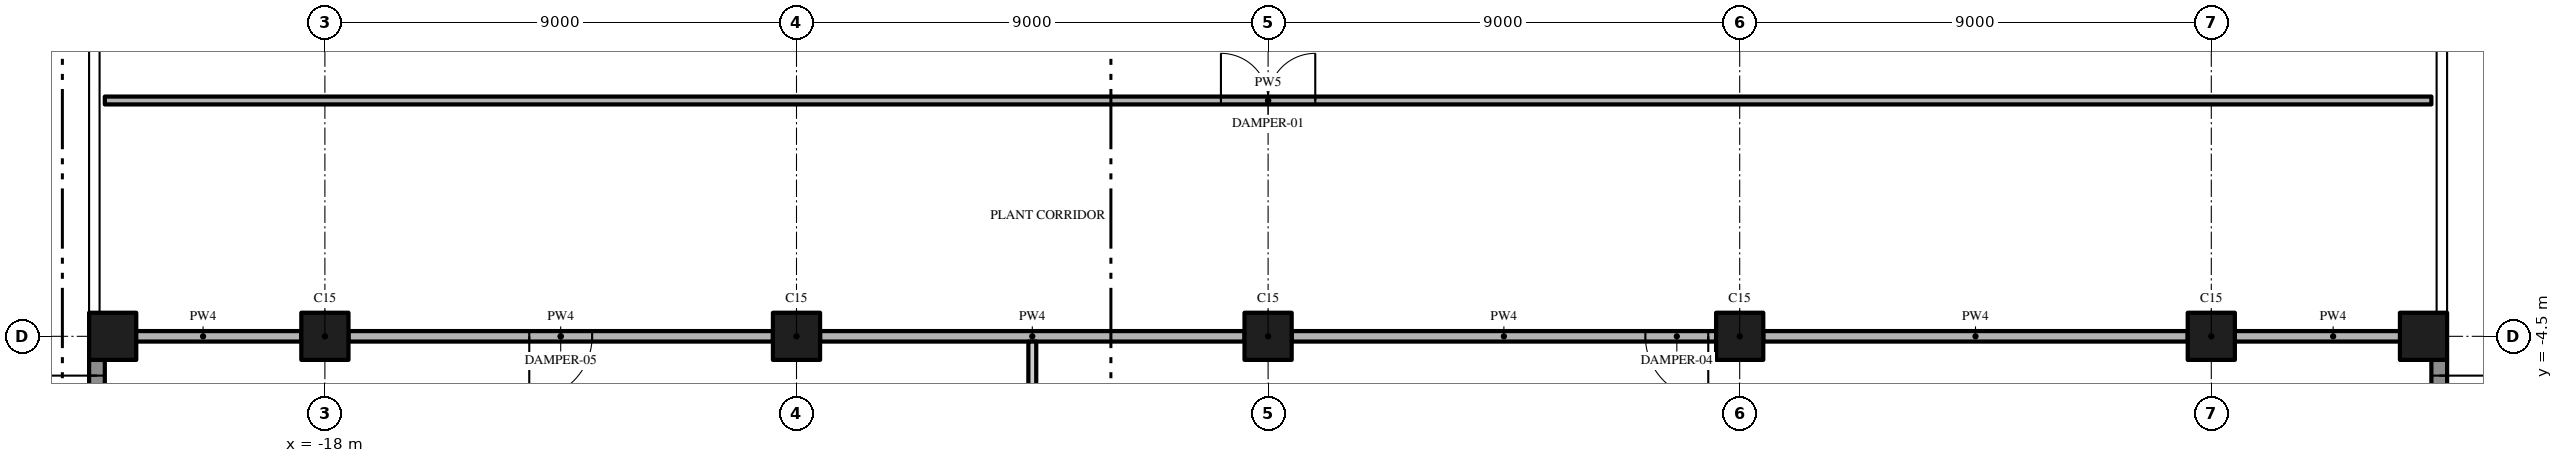
"""IFC4 building model, lengths in metres.
Left out: names, types, materials, properties, quantities, classifications, styles, units other than length and angle.
Written with IfcOpenShell. Run it as: python <this file> out.ifc"""

import sys

from ifc_helpers import new_model, si_unit, direction, frame, frame_2d, origin, origin_2d, place, context, subcontext, project, spatial, rectangle, extrude, element, fill, save


model = new_model("IFC4")
c1 = context("Model", 3, precision=1e-05, world=origin(), true_north=direction((0.0, 1.0)))
c2 = subcontext(c1, "Body", "Model", "MODEL_VIEW")
j1 = project(units=[si_unit("LENGTHUNIT", "METRE"), si_unit("PLANEANGLEUNIT", "RADIAN")], contexts=[c1])
p1 = place(None, origin())
s1 = spatial("IfcSite", under=j1, at=p1, CompositionType="ELEMENT")
p2 = place(p1, origin())
s2 = spatial("IfcBuilding", under=s1, at=p2, CompositionType="ELEMENT")
p3 = place(p2, frame((0.0, 0.0, 289.4)))
s3 = spatial("IfcBuildingStorey", under=s2, at=p3, CompositionType="ELEMENT", Elevation=289.4)
p4 = place(p3, frame((-18.0, -4.5, 0.0), z_axis=(0.0, 0.0, 1.0), x_axis=(1.0, 0.0, 0.0)))
e1 = element("IfcColumn", 1, at=p4, inside=s3, PredefinedType="COLUMN", context=c2, shape_type="SweptSolid", body=[
    extrude(rectangle(XDim=0.9, YDim=0.9, at=origin_2d()), origin(), (0.0, 0.0, 1.0), 7.7),
])
p5 = place(p3, frame((-26.55, -4.5, 0.0), z_axis=(0.504568019295, 0.0, 0.863371944127), x_axis=(0.0, 1.0, 0.0)))
e2 = element("IfcColumn", 2, at=p5, inside=s3, PredefinedType="COLUMN", context=c2, shape_type="SweptSolid", body=[
    extrude(rectangle(XDim=0.9, YDim=0.9, at=origin_2d()), origin(), (0.0, 0.0, 1.0), 8.919),
])
for number, where, z_axis, x_axis in (
    (3, (-9.0, -4.5, 0.0), (0.0, 0.0, 1.0), (1.0, 0.0, 0.0)),
    (4, (0.0, -4.5, 0.0), (0.0, 0.0, 1.0), (1.0, 0.0, 0.0)),
    (5, (18.0, -4.5, 0.0), (0.0, 0.0, 1.0), (1.0, 0.0, 0.0)),
):
    element("IfcColumn", number, at=place(p3, frame(where, z_axis=z_axis, x_axis=x_axis)), inside=s3, PredefinedType="COLUMN", context=c2, shape_type="SweptSolid", body=[
        extrude(rectangle(XDim=0.9, YDim=0.9, at=origin_2d()), origin(), (0.0, 0.0, 1.0), 7.7),
    ])
p6 = place(p3, frame((26.55, -4.5, 0.0), z_axis=(-0.504568019295, 0.0, 0.863371944127), x_axis=(0.0, -1.0, 0.0)))
e6 = element("IfcColumn", 6, at=p6, inside=s3, PredefinedType="COLUMN", context=c2, shape_type="SweptSolid", body=[
    extrude(rectangle(XDim=0.9, YDim=0.9, at=origin_2d()), origin(), (0.0, 0.0, 1.0), 8.919),
])
p7 = place(p3, frame((9.0, -4.5, 0.0), z_axis=(0.0, 0.0, 1.0), x_axis=(1.0, 0.0, 0.0)))
e7 = element("IfcColumn", 7, at=p7, inside=s3, PredefinedType="COLUMN", context=c2, shape_type="SweptSolid", body=[
    extrude(rectangle(XDim=0.9, YDim=0.9, at=origin_2d()), origin(), (0.0, 0.0, 1.0), 7.7),
])
p8 = place(p3, frame((22.35, -4.95, 0.0), z_axis=(0.0, 0.0, 1.0), x_axis=(0.0, -1.0, 0.0)))
e8 = element("IfcWall", 8, at=p8, inside=s3, PredefinedType="SOLIDWALL", context=c2, shape_type="SweptSolid", body=[
    extrude(rectangle(XDim=4.05, YDim=0.3, at=frame_2d((2.025, 0.0))), origin(), (0.0, 0.0, 1.0), 7.7),
])
p9 = place(p8, frame((0.3, 0.0, 0.0)))
e9 = element("IfcOpeningElement", 9, at=p9, cuts=e8, PredefinedType="OPENING", context=c2, shape_type="SweptSolid", body=[
    extrude(rectangle(XDim=3.2, YDim=2.4, at=frame_2d((1.6, 1.2))), frame((0.0, 0.16, 0.0), z_axis=(0.0, -1.0, 0.0), x_axis=(1.0, 0.0, 0.0)), (0.0, 0.0, 1.0), 0.32),
])
p10 = place(p3, frame((-22.35, -9.0, 0.0), z_axis=(0.0, 0.0, 1.0), x_axis=(0.0, 1.0, 0.0)))
e10 = element("IfcWall", 10, at=p10, inside=s3, PredefinedType="SOLIDWALL", context=c2, shape_type="SweptSolid", body=[
    extrude(rectangle(XDim=4.05, YDim=0.3, at=frame_2d((2.025, 0.0))), origin(), (0.0, 0.0, 1.0), 7.7),
])
p11 = place(p10, frame((0.55, 0.0, 0.0)))
e11 = element("IfcOpeningElement", 11, at=p11, cuts=e10, PredefinedType="OPENING", context=c2, shape_type="SweptSolid", body=[
    extrude(rectangle(XDim=3.2, YDim=2.4, at=frame_2d((1.6, 1.2))), frame((0.0, 0.16, 0.0), z_axis=(0.0, -1.0, 0.0), x_axis=(1.0, 0.0, 0.0)), (0.0, 0.0, 1.0), 0.32),
])
p12 = place(p3, frame((-22.2, -4.5, 0.0), z_axis=(0.0, 0.0, 1.0), x_axis=(1.0, 0.0, 0.0)))
e12 = element("IfcWall", 12, at=p12, inside=s3, PredefinedType="PARTITIONING", context=c2, shape_type="SweptSolid", body=[
    extrude(rectangle(XDim=3.75, YDim=0.2, at=frame_2d((1.875, 0.0))), origin(), (0.0, 0.0, 1.0), 7.7),
])
p13 = place(p3, frame((-9.45, -4.5, 0.0), z_axis=(0.0, 0.0, 1.0), x_axis=(-1.0, 0.0, 0.0)))
e13 = element("IfcWall", 13, at=p13, inside=s3, PredefinedType="PARTITIONING", context=c2, shape_type="SweptSolid", body=[
    extrude(rectangle(XDim=8.1, YDim=0.2, at=frame_2d((4.05, 0.0))), origin(), (0.0, 0.0, 1.0), 7.7),
])
p14 = place(p13, frame((3.45, 0.0, 0.0)))
e14 = element("IfcOpeningElement", 14, at=p14, cuts=e13, PredefinedType="OPENING", context=c2, shape_type="SweptSolid", body=[
    extrude(rectangle(XDim=1.2, YDim=2.4, at=frame_2d((0.6, 1.2))), frame((0.0, 0.11, 0.0), z_axis=(0.0, -1.0, 0.0), x_axis=(1.0, 0.0, 0.0)), (0.0, 0.0, 1.0), 0.22),
])
p15 = place(p3, frame((-8.55, -4.5, 0.0), z_axis=(0.0, 0.0, 1.0), x_axis=(1.0, 0.0, 0.0)))
e15 = element("IfcWall", 15, at=p15, inside=s3, PredefinedType="PARTITIONING", context=c2, shape_type="SweptSolid", body=[
    extrude(rectangle(XDim=8.1, YDim=0.2, at=frame_2d((4.05, 0.0))), origin(), (0.0, 0.0, 1.0), 7.7),
])
p16 = place(p3, frame((8.55, -4.5, 0.0), z_axis=(0.0, 0.0, 1.0), x_axis=(-1.0, 0.0, 0.0)))
e16 = element("IfcWall", 16, at=p16, inside=s3, PredefinedType="PARTITIONING", context=c2, shape_type="SweptSolid", body=[
    extrude(rectangle(XDim=8.1, YDim=0.2, at=frame_2d((4.05, 0.0))), origin(), (0.0, 0.0, 1.0), 7.7),
])
p17 = place(p16, frame((0.15, 0.0, 0.0)))
e17 = element("IfcOpeningElement", 17, at=p17, cuts=e16, PredefinedType="OPENING", context=c2, shape_type="SweptSolid", body=[
    extrude(rectangle(XDim=1.2, YDim=2.4, at=frame_2d((0.6, 1.2))), frame((0.0, 0.11, 0.0), z_axis=(0.0, -1.0, 0.0), x_axis=(1.0, 0.0, 0.0)), (0.0, 0.0, 1.0), 0.22),
])
p18 = place(p3, frame((9.45, -4.5, 0.0), z_axis=(0.0, 0.0, 1.0), x_axis=(1.0, 0.0, 0.0)))
e18 = element("IfcWall", 18, at=p18, inside=s3, PredefinedType="PARTITIONING", context=c2, shape_type="SweptSolid", body=[
    extrude(rectangle(XDim=8.1, YDim=0.2, at=frame_2d((4.05, 0.0))), origin(), (0.0, 0.0, 1.0), 7.7),
])
p19 = place(p3, frame((18.45, -4.5, 0.0), z_axis=(0.0, 0.0, 1.0), x_axis=(1.0, 0.0, 0.0)))
e19 = element("IfcWall", 19, at=p19, inside=s3, PredefinedType="PARTITIONING", context=c2, shape_type="SweptSolid", body=[
    extrude(rectangle(XDim=3.75, YDim=0.2, at=frame_2d((1.875, 0.0))), origin(), (0.0, 0.0, 1.0), 7.7),
])
p20 = place(p3, frame((-22.2, 0.0, 0.0), z_axis=(0.0, 0.0, 1.0), x_axis=(1.0, 0.0, 0.0)))
e20 = element("IfcWall", 20, at=p20, inside=s3, PredefinedType="PARTITIONING", context=c2, shape_type="SweptSolid", body=[
    extrude(rectangle(XDim=44.4, YDim=0.15, at=frame_2d((22.2, 0.0))), origin(), (0.0, 0.0, 1.0), 7.7),
])
p21 = place(p20, frame((21.3, 0.0, 0.0)))
e21 = element("IfcOpeningElement", 21, at=p21, cuts=e20, PredefinedType="OPENING", context=c2, shape_type="SweptSolid", body=[
    extrude(rectangle(XDim=1.8, YDim=2.4, at=frame_2d((0.9, 1.2))), frame((0.0, 0.085, 0.0), z_axis=(0.0, -1.0, 0.0), x_axis=(1.0, 0.0, 0.0)), (0.0, 0.0, 1.0), 0.17),
])
p22 = place(p3, frame((-4.5, -17.7, 0.0), z_axis=(0.0, 0.0, 1.0), x_axis=(0.0, 1.0, 0.0)))
e22 = element("IfcWall", 22, at=p22, inside=s3, PredefinedType="PARTITIONING", context=c2, shape_type="SweptSolid", body=[
    extrude(rectangle(XDim=13.1, YDim=0.15, at=frame_2d((6.55, 0.0))), origin(), (0.0, 0.0, 1.0), 7.7),
])
p23 = place(p9, origin())
e23 = element("IfcDoor", 23, at=p23, inside=s3, OperationType="SINGLE_SWING_LEFT", PredefinedType="DOOR", context=c2, shape_type="SweptSolid", body=[
    extrude(rectangle(XDim=3.2, YDim=2.4, at=frame_2d((1.6, 1.2))), frame((0.0, 0.025, 0.0), z_axis=(0.0, -1.0, 0.0), x_axis=(1.0, 0.0, 0.0)), (0.0, 0.0, 1.0), 0.05),
])
fill(e9, e23)
p24 = place(p11, origin())
e24 = element("IfcDoor", 24, at=p24, inside=s3, OperationType="SINGLE_SWING_LEFT", PredefinedType="DOOR", context=c2, shape_type="SweptSolid", body=[
    extrude(rectangle(XDim=3.2, YDim=2.4, at=frame_2d((1.6, 1.2))), frame((0.0, 0.025, 0.0), z_axis=(0.0, -1.0, 0.0), x_axis=(1.0, 0.0, 0.0)), (0.0, 0.0, 1.0), 0.05),
])
fill(e11, e24)
p25 = place(p21, origin())
e25 = element("IfcDoor", 25, at=p25, inside=s3, OperationType="DOUBLE_DOOR_SINGLE_SWING", PredefinedType="DOOR", context=c2, shape_type="SweptSolid", body=[
    extrude(rectangle(XDim=1.8, YDim=2.4, at=frame_2d((0.9, 1.2))), frame((0.0, 0.025, 0.0), z_axis=(0.0, -1.0, 0.0), x_axis=(1.0, 0.0, 0.0)), (0.0, 0.0, 1.0), 0.05),
])
fill(e21, e25)
p26 = place(p17, origin())
e26 = element("IfcDoor", 26, at=p26, inside=s3, OperationType="SINGLE_SWING_LEFT", PredefinedType="DOOR", context=c2, shape_type="SweptSolid", body=[
    extrude(rectangle(XDim=1.2, YDim=2.4, at=frame_2d((0.6, 1.2))), frame((0.0, 0.025, 0.0), z_axis=(0.0, -1.0, 0.0), x_axis=(1.0, 0.0, 0.0)), (0.0, 0.0, 1.0), 0.05),
])
fill(e17, e26)
p27 = place(p14, origin())
e27 = element("IfcDoor", 27, at=p27, inside=s3, OperationType="SINGLE_SWING_RIGHT", PredefinedType="DOOR", context=c2, shape_type="SweptSolid", body=[
    extrude(rectangle(XDim=1.2, YDim=2.4, at=frame_2d((0.6, 1.2))), frame((0.0, 0.025, 0.0), z_axis=(0.0, -1.0, 0.0), x_axis=(1.0, 0.0, 0.0)), (0.0, 0.0, 1.0), 0.05),
])
fill(e14, e27)
save(model, sys.argv[1])
